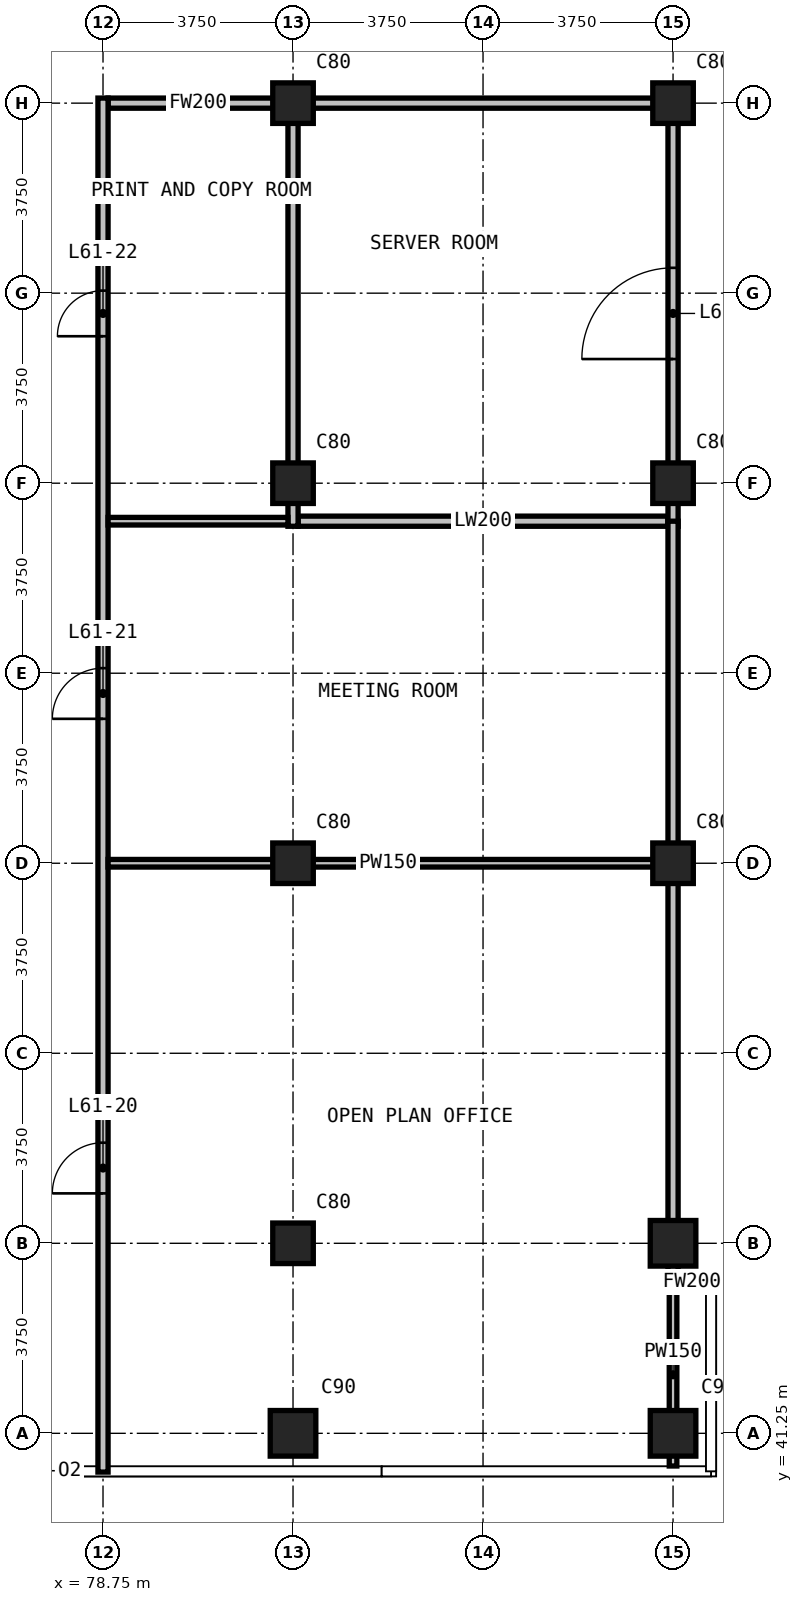
"""IFC4 building model, lengths in metres.
Left out: names, types, materials, properties, quantities, classifications, styles, units other than length and angle.
Written with IfcOpenShell. Run it as: python <this file> out.ifc"""

import sys

from ifc_helpers import new_model, si_unit, direction, frame, frame_2d, origin, origin_2d, place, context, subcontext, project, spatial, rectangle, extrude, element, fill, save


model = new_model("IFC4")
c1 = context("Model", 3, precision=1e-05, world=origin(), true_north=direction((0.0, 1.0)))
c2 = subcontext(c1, "Body", "Model", "MODEL_VIEW")
j1 = project(units=[si_unit("LENGTHUNIT", "METRE"), si_unit("PLANEANGLEUNIT", "RADIAN")], contexts=[c1])
p1 = place(None, origin())
s1 = spatial("IfcSite", under=j1, at=p1, CompositionType="ELEMENT")
p2 = place(p1, origin())
s2 = spatial("IfcBuilding", under=s1, at=p2, CompositionType="ELEMENT")
p3 = place(p2, frame((0.0, 0.0, 235.5)))
s3 = spatial("IfcBuildingStorey", under=s2, at=p3, CompositionType="ELEMENT", Elevation=235.5)
p4 = place(p3, frame((82.5, 41.25, 0.0), z_axis=(0.0, 0.0, 1.0), x_axis=(1.0, 0.0, 0.0)))
e1 = element("IfcColumn", 1, at=p4, inside=s3, PredefinedType="COLUMN", context=c2, shape_type="SweptSolid", body=[
    extrude(rectangle(XDim=0.9, YDim=0.9, at=origin_2d()), origin(), (0.0, 0.0, 1.0), 3.6),
])
for number, where, z_axis, x_axis in (
    (2, (82.5, 45.0, 0.0), (0.0, 0.0, 1.0), (1.0, 0.0, 0.0)),
    (3, (82.5, 52.5, 0.0), (0.0, 0.0, 1.0), (1.0, 0.0, 0.0)),
    (4, (82.5, 60.0, 0.0), (0.0, 0.0, 1.0), (1.0, 0.0, 0.0)),
    (5, (82.5, 67.5, 0.0), (0.0, 0.0, 1.0), (1.0, 0.0, 0.0)),
):
    element("IfcColumn", number, at=place(p3, frame(where, z_axis=z_axis, x_axis=x_axis)), inside=s3, PredefinedType="COLUMN", context=c2, shape_type="SweptSolid", body=[
        extrude(rectangle(XDim=0.8, YDim=0.8, at=origin_2d()), origin(), (0.0, 0.0, 1.0), 3.6),
    ])
for number, where, z_axis, x_axis in (
    (6, (90.0, 41.25, 0.0), (0.0, 0.0, 1.0), (1.0, 0.0, 0.0)),
    (7, (90.0, 45.0, 0.0), (0.0, 0.0, 1.0), (1.0, 0.0, 0.0)),
):
    element("IfcColumn", number, at=place(p3, frame(where, z_axis=z_axis, x_axis=x_axis)), inside=s3, PredefinedType="COLUMN", context=c2, shape_type="SweptSolid", body=[
        extrude(rectangle(XDim=0.9, YDim=0.9, at=origin_2d()), origin(), (0.0, 0.0, 1.0), 3.6),
    ])
for number, where, z_axis, x_axis in (
    (8, (90.0, 52.5, 0.0), (0.0, 0.0, 1.0), (1.0, 0.0, 0.0)),
    (9, (90.0, 60.0, 0.0), (0.0, 0.0, 1.0), (1.0, 0.0, 0.0)),
    (10, (90.0, 67.5, 0.0), (0.0, 0.0, 1.0), (1.0, 0.0, 0.0)),
):
    element("IfcColumn", number, at=place(p3, frame(where, z_axis=z_axis, x_axis=x_axis)), inside=s3, PredefinedType="COLUMN", context=c2, shape_type="SweptSolid", body=[
        extrude(rectangle(XDim=0.8, YDim=0.8, at=origin_2d()), origin(), (0.0, 0.0, 1.0), 3.6),
    ])
for number, where, z_axis, x_axis in (
    (11, (82.6, 59.25, 0.0), (0.0, 0.0, 1.0), (1.0, 0.0, 0.0)),
    (12, (82.6, 67.5, 0.0), (0.0, 0.0, 1.0), (1.0, 0.0, 0.0)),
):
    element("IfcWall", number, at=place(p3, frame(where, z_axis=z_axis, x_axis=x_axis)), inside=s3, PredefinedType="PARTITIONING", context=c2, shape_type="SweptSolid", body=[
        extrude(rectangle(XDim=7.3, YDim=0.2, at=frame_2d((3.65, 0.0))), origin(), (0.0, 0.0, 1.0), 3.3),
    ])
p5 = place(p3, frame((82.5, 59.15, 0.0), z_axis=(0.0, 0.0, 1.0), x_axis=(0.0, 1.0, 0.0)))
e13 = element("IfcWall", 13, at=p5, inside=s3, PredefinedType="PARTITIONING", context=c2, shape_type="SweptSolid", body=[
    extrude(rectangle(XDim=8.45, YDim=0.2, at=frame_2d((4.225, 0.0))), origin(), (0.0, 0.0, 1.0), 3.3),
])
p6 = place(p3, frame((90.0, 59.15, 0.0), z_axis=(0.0, 0.0, 1.0), x_axis=(0.0, 1.0, 0.0)))
e14 = element("IfcWall", 14, at=p6, inside=s3, PredefinedType="PARTITIONING", context=c2, shape_type="SweptSolid", body=[
    extrude(rectangle(XDim=8.45, YDim=0.2, at=frame_2d((4.225, 0.0))), origin(), (0.0, 0.0, 1.0), 3.3),
])
p7 = place(p6, frame((3.3, 0.0, 0.0)))
e15 = element("IfcOpeningElement", 15, at=p7, cuts=e14, PredefinedType="OPENING", context=c2, shape_type="SweptSolid", body=[
    extrude(rectangle(XDim=1.8, YDim=2.4, at=frame_2d((0.9, 1.2))), frame((0.0, 0.11, 0.0), z_axis=(0.0, -1.0, 0.0), x_axis=(1.0, 0.0, 0.0)), (0.0, 0.0, 1.0), 0.22),
])
p8 = place(p3, frame((90.1, 44.235, 0.0), z_axis=(0.0, 0.0, 1.0), x_axis=(1.0, 0.0, 0.0)))
e16 = element("IfcWall", 16, at=p8, inside=s3, PredefinedType="PARTITIONING", context=c2, shape_type="SweptSolid", body=[
    extrude(rectangle(XDim=0.545, YDim=0.2, at=frame_2d((0.272, 0.0))), origin(), (0.0, 0.0, 1.0), 3.3),
])
p9 = place(p3, frame((78.85, 67.5, 0.0), z_axis=(0.0, 0.0, 1.0), x_axis=(1.0, 0.0, 0.0)))
e17 = element("IfcWall", 17, at=p9, inside=s3, PredefinedType="PARTITIONING", context=c2, shape_type="SweptSolid", body=[
    extrude(rectangle(XDim=3.55, YDim=0.2, at=frame_2d((1.775, 0.0))), origin(), (0.0, 0.0, 1.0), 3.3),
])
p10 = place(p3, frame((78.75, 40.485, 0.0), z_axis=(0.0, 0.0, 1.0), x_axis=(0.0, 1.0, 0.0)))
e18 = element("IfcWall", 18, at=p10, inside=s3, PredefinedType="PARTITIONING", context=c2, shape_type="SweptSolid", body=[
    extrude(rectangle(XDim=27.115, YDim=0.2, at=frame_2d((13.558, 0.0))), origin(), (0.0, 0.0, 1.0), 3.3),
])
p11 = place(p10, frame((5.5, 0.0, 0.0)))
e19 = element("IfcOpeningElement", 19, at=p11, cuts=e18, PredefinedType="OPENING", context=c2, shape_type="SweptSolid", body=[
    extrude(rectangle(XDim=1.0, YDim=2.2, at=frame_2d((0.5, 1.1))), frame((0.0, 0.11, 0.0), z_axis=(0.0, -1.0, 0.0), x_axis=(1.0, 0.0, 0.0)), (0.0, 0.0, 1.0), 0.22),
])
p12 = place(p10, frame((14.865, 0.0, 0.0)))
e20 = element("IfcOpeningElement", 20, at=p12, cuts=e18, PredefinedType="OPENING", context=c2, shape_type="SweptSolid", body=[
    extrude(rectangle(XDim=1.0, YDim=2.2, at=frame_2d((0.5, 1.1))), frame((0.0, 0.11, 0.0), z_axis=(0.0, -1.0, 0.0), x_axis=(1.0, 0.0, 0.0)), (0.0, 0.0, 1.0), 0.22),
])
p13 = place(p10, frame((22.415, 0.0, 0.0)))
e21 = element("IfcOpeningElement", 21, at=p13, cuts=e18, PredefinedType="OPENING", context=c2, shape_type="SweptSolid", body=[
    extrude(rectangle(XDim=0.9, YDim=2.2, at=frame_2d((0.45, 1.1))), frame((0.0, 0.11, 0.0), z_axis=(0.0, -1.0, 0.0), x_axis=(1.0, 0.0, 0.0)), (0.0, 0.0, 1.0), 0.22),
])
p14 = place(p3, frame((90.0, 44.135, 0.0), z_axis=(0.0, 0.0, 1.0), x_axis=(0.0, 1.0, 0.0)))
e22 = element("IfcWall", 22, at=p14, inside=s3, PredefinedType="PARTITIONING", context=c2, shape_type="SweptSolid", body=[
    extrude(rectangle(XDim=15.115, YDim=0.2, at=frame_2d((7.558, 0.0))), origin(), (0.0, 0.0, 1.0), 3.3),
])
p15 = place(p3, frame((78.85, 52.5, 0.0), z_axis=(0.0, 0.0, 1.0), x_axis=(1.0, 0.0, 0.0)))
e23 = element("IfcWall", 23, at=p15, inside=s3, PredefinedType="PARTITIONING", context=c2, shape_type="SweptSolid", body=[
    extrude(rectangle(XDim=11.05, YDim=0.15, at=frame_2d((5.525, 0.0))), origin(), (0.0, 0.0, 1.0), 3.3),
])
p16 = place(p3, frame((78.85, 59.25, 0.0), z_axis=(0.0, 0.0, 1.0), x_axis=(1.0, 0.0, 0.0)))
e24 = element("IfcWall", 24, at=p16, inside=s3, PredefinedType="PARTITIONING", context=c2, shape_type="SweptSolid", body=[
    extrude(rectangle(XDim=3.55, YDim=0.15, at=frame_2d((1.775, 0.0))), origin(), (0.0, 0.0, 1.0), 3.3),
])
p17 = place(p3, frame((90.0, 40.605, 0.0), z_axis=(0.0, 0.0, 1.0), x_axis=(0.0, 1.0, 0.0)))
e25 = element("IfcWall", 25, at=p17, inside=s3, PredefinedType="PARTITIONING", context=c2, shape_type="SweptSolid", body=[
    extrude(rectangle(XDim=3.6, YDim=0.15, at=frame_2d((1.8, 0.0))), origin(), (0.0, 0.0, 1.0), 3.3),
])
p18 = place(p11, origin())
e26 = element("IfcDoor", 26, at=p18, inside=s3, OperationType="SINGLE_SWING_LEFT", PredefinedType="DOOR", context=c2, shape_type="SweptSolid", body=[
    extrude(rectangle(XDim=1.0, YDim=2.2, at=frame_2d((0.5, 1.1))), frame((0.0, 0.025, 0.0), z_axis=(0.0, -1.0, 0.0), x_axis=(1.0, 0.0, 0.0)), (0.0, 0.0, 1.0), 0.05),
])
fill(e19, e26)
p19 = place(p12, origin())
e27 = element("IfcDoor", 27, at=p19, inside=s3, OperationType="SINGLE_SWING_LEFT", PredefinedType="DOOR", context=c2, shape_type="SweptSolid", body=[
    extrude(rectangle(XDim=1.0, YDim=2.2, at=frame_2d((0.5, 1.1))), frame((0.0, 0.025, 0.0), z_axis=(0.0, -1.0, 0.0), x_axis=(1.0, 0.0, 0.0)), (0.0, 0.0, 1.0), 0.05),
])
fill(e20, e27)
p20 = place(p13, origin())
e28 = element("IfcDoor", 28, at=p20, inside=s3, OperationType="SINGLE_SWING_RIGHT", PredefinedType="DOOR", context=c2, shape_type="SweptSolid", body=[
    extrude(rectangle(XDim=0.9, YDim=2.2, at=frame_2d((0.45, 1.1))), frame((0.0, 0.025, 0.0), z_axis=(0.0, -1.0, 0.0), x_axis=(1.0, 0.0, 0.0)), (0.0, 0.0, 1.0), 0.05),
])
fill(e21, e28)
p21 = place(p7, origin())
e29 = element("IfcDoor", 29, at=p21, inside=s3, OperationType="DOUBLE_DOOR_SINGLE_SWING", PredefinedType="DOOR", context=c2, shape_type="SweptSolid", body=[
    extrude(rectangle(XDim=1.8, YDim=2.4, at=frame_2d((0.9, 1.2))), frame((0.0, 0.025, 0.0), z_axis=(0.0, -1.0, 0.0), x_axis=(1.0, 0.0, 0.0)), (0.0, 0.0, 1.0), 0.05),
])
fill(e15, e29)
save(model, sys.argv[1])
